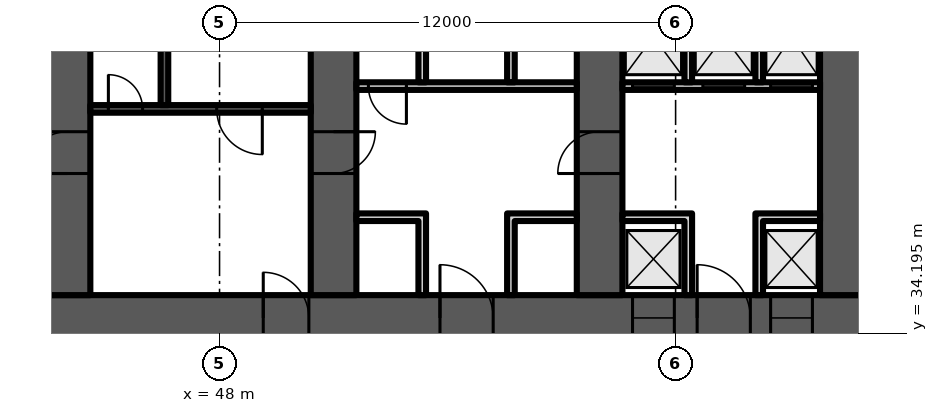
"""IFC4 building model, lengths in metres.
Left out: names, types, materials, properties, quantities, classifications, styles, units other than length and angle.
Written with IfcOpenShell. Run it as: python <this file> out.ifc"""

import sys

from ifc_helpers import new_model, si_unit, direction, frame, frame_2d, origin, place, context, subcontext, project, spatial, polyline, rectangle, outline, extrude, element, fill, save


model = new_model("IFC4")
c1 = context("Model", 3, precision=1e-05, world=origin(), true_north=direction((0.0, 1.0)))
c2 = subcontext(c1, "Body", "Model", "MODEL_VIEW")
j1 = project(units=[si_unit("LENGTHUNIT", "METRE"), si_unit("PLANEANGLEUNIT", "RADIAN")], contexts=[c1])
p1 = place(None, origin())
s1 = spatial("IfcSite", under=j1, at=p1, CompositionType="ELEMENT")
p2 = place(p1, origin())
s2 = spatial("IfcBuilding", under=s1, at=p2, CompositionType="ELEMENT")
p3 = place(p2, frame((0.0, 0.0, 59.5)))
s3 = spatial("IfcBuildingStorey", under=s2, at=p3, CompositionType="ELEMENT", Elevation=59.5)
p4 = place(p3, frame((9.0, 34.6, 0.0), z_axis=(0.0, 0.0, 1.0), x_axis=(1.0, 0.0, 0.0)))
e1 = element("IfcWall", 1, at=p4, inside=s3, PredefinedType="SHEAR", context=c2, shape_type="SweptSolid", body=[
    extrude(rectangle(XDim=56.0, YDim=1.2, at=frame_2d((28.0, 0.0))), origin(), (0.0, 0.0, 1.0), 3.6),
])
p5 = place(p4, frame((2.0, 0.0, 0.0)))
e2 = element("IfcOpeningElement", 2, at=p5, cuts=e1, PredefinedType="OPENING", context=c2, shape_type="SweptSolid", body=[
    extrude(rectangle(XDim=1.0, YDim=2.1, at=frame_2d((0.5, 1.05))), frame((0.0, 0.61, 0.0), z_axis=(0.0, -1.0, 0.0), x_axis=(1.0, 0.0, 0.0)), (0.0, 0.0, 1.0), 1.22),
])
p6 = place(p4, frame((4.6, 0.0, 0.0)))
e3 = element("IfcOpeningElement", 3, at=p6, cuts=e1, PredefinedType="OPENING", context=c2, shape_type="SweptSolid", body=[
    extrude(rectangle(XDim=1.0, YDim=2.1, at=frame_2d((0.5, 1.05))), frame((0.0, 0.61, 0.0), z_axis=(0.0, -1.0, 0.0), x_axis=(1.0, 0.0, 0.0)), (0.0, 0.0, 1.0), 1.22),
])
p7 = place(p4, frame((7.867, 0.0, 0.0)))
e4 = element("IfcOpeningElement", 4, at=p7, cuts=e1, PredefinedType="OPENING", context=c2, shape_type="SweptSolid", body=[
    extrude(rectangle(XDim=1.1, YDim=2.1, at=frame_2d((0.55, 1.05))), frame((0.0, 0.61, 0.0), z_axis=(0.0, -1.0, 0.0), x_axis=(1.0, 0.0, 0.0)), (0.0, 0.0, 1.0), 1.22),
])
p8 = place(p4, frame((12.033, 0.0, 0.0)))
e5 = element("IfcOpeningElement", 5, at=p8, cuts=e1, PredefinedType="OPENING", context=c2, shape_type="SweptSolid", body=[
    extrude(rectangle(XDim=1.1, YDim=2.1, at=frame_2d((0.55, 1.05))), frame((0.0, 0.61, 0.0), z_axis=(0.0, -1.0, 0.0), x_axis=(1.0, 0.0, 0.0)), (0.0, 0.0, 1.0), 1.22),
])
p9 = place(p4, frame((9.8, 0.0, 0.0)))
e6 = element("IfcOpeningElement", 6, at=p9, cuts=e1, PredefinedType="OPENING", context=c2, shape_type="SweptSolid", body=[
    extrude(rectangle(XDim=1.4, YDim=2.1, at=frame_2d((0.7, 1.05))), frame((0.0, 0.61, 0.0), z_axis=(0.0, -1.0, 0.0), x_axis=(1.0, 0.0, 0.0)), (0.0, 0.0, 1.0), 1.22),
])
p10 = place(p4, frame((14.65, 0.0, 0.0)))
e7 = element("IfcOpeningElement", 7, at=p10, cuts=e1, PredefinedType="OPENING", context=c2, shape_type="SweptSolid", body=[
    extrude(rectangle(XDim=1.2, YDim=2.1, at=frame_2d((0.6, 1.05))), frame((0.0, 0.61, 0.0), z_axis=(0.0, -1.0, 0.0), x_axis=(1.0, 0.0, 0.0)), (0.0, 0.0, 1.0), 1.22),
])
p11 = place(p4, frame((21.867, 0.0, 0.0)))
e8 = element("IfcOpeningElement", 8, at=p11, cuts=e1, PredefinedType="OPENING", context=c2, shape_type="SweptSolid", body=[
    extrude(rectangle(XDim=1.1, YDim=2.1, at=frame_2d((0.55, 1.05))), frame((0.0, 0.61, 0.0), z_axis=(0.0, -1.0, 0.0), x_axis=(1.0, 0.0, 0.0)), (0.0, 0.0, 1.0), 1.22),
])
p12 = place(p4, frame((26.033, 0.0, 0.0)))
e9 = element("IfcOpeningElement", 9, at=p12, cuts=e1, PredefinedType="OPENING", context=c2, shape_type="SweptSolid", body=[
    extrude(rectangle(XDim=1.1, YDim=2.1, at=frame_2d((0.55, 1.05))), frame((0.0, 0.61, 0.0), z_axis=(0.0, -1.0, 0.0), x_axis=(1.0, 0.0, 0.0)), (0.0, 0.0, 1.0), 1.22),
])
p13 = place(p4, frame((23.8, 0.0, 0.0)))
e10 = element("IfcOpeningElement", 10, at=p13, cuts=e1, PredefinedType="OPENING", context=c2, shape_type="SweptSolid", body=[
    extrude(rectangle(XDim=1.4, YDim=2.1, at=frame_2d((0.7, 1.05))), frame((0.0, 0.61, 0.0), z_axis=(0.0, -1.0, 0.0), x_axis=(1.0, 0.0, 0.0)), (0.0, 0.0, 1.0), 1.22),
])
p14 = place(p4, frame((28.867, 0.0, 0.0)))
e11 = element("IfcOpeningElement", 11, at=p14, cuts=e1, PredefinedType="OPENING", context=c2, shape_type="SweptSolid", body=[
    extrude(rectangle(XDim=1.1, YDim=2.1, at=frame_2d((0.55, 1.05))), frame((0.0, 0.61, 0.0), z_axis=(0.0, -1.0, 0.0), x_axis=(1.0, 0.0, 0.0)), (0.0, 0.0, 1.0), 1.22),
])
p15 = place(p4, frame((33.033, 0.0, 0.0)))
e12 = element("IfcOpeningElement", 12, at=p15, cuts=e1, PredefinedType="OPENING", context=c2, shape_type="SweptSolid", body=[
    extrude(rectangle(XDim=1.1, YDim=2.1, at=frame_2d((0.55, 1.05))), frame((0.0, 0.61, 0.0), z_axis=(0.0, -1.0, 0.0), x_axis=(1.0, 0.0, 0.0)), (0.0, 0.0, 1.0), 1.22),
])
p16 = place(p4, frame((40.15, 0.0, 0.0)))
e13 = element("IfcOpeningElement", 13, at=p16, cuts=e1, PredefinedType="OPENING", context=c2, shape_type="SweptSolid", body=[
    extrude(rectangle(XDim=1.2, YDim=2.1, at=frame_2d((0.6, 1.05))), frame((0.0, 0.61, 0.0), z_axis=(0.0, -1.0, 0.0), x_axis=(1.0, 0.0, 0.0)), (0.0, 0.0, 1.0), 1.22),
])
p17 = place(p4, frame((44.8, 0.0, 0.0)))
e14 = element("IfcOpeningElement", 14, at=p17, cuts=e1, PredefinedType="OPENING", context=c2, shape_type="SweptSolid", body=[
    extrude(rectangle(XDim=1.4, YDim=2.1, at=frame_2d((0.7, 1.05))), frame((0.0, 0.61, 0.0), z_axis=(0.0, -1.0, 0.0), x_axis=(1.0, 0.0, 0.0)), (0.0, 0.0, 1.0), 1.22),
])
p18 = place(p4, frame((49.867, 0.0, 0.0)))
e15 = element("IfcOpeningElement", 15, at=p18, cuts=e1, PredefinedType="OPENING", context=c2, shape_type="SweptSolid", body=[
    extrude(rectangle(XDim=1.1, YDim=2.1, at=frame_2d((0.55, 1.05))), frame((0.0, 0.61, 0.0), z_axis=(0.0, -1.0, 0.0), x_axis=(1.0, 0.0, 0.0)), (0.0, 0.0, 1.0), 1.22),
])
p19 = place(p4, frame((53.5, 0.0, 0.0)))
e16 = element("IfcOpeningElement", 16, at=p19, cuts=e1, PredefinedType="OPENING", context=c2, shape_type="SweptSolid", body=[
    extrude(rectangle(XDim=1.1, YDim=2.1, at=frame_2d((0.55, 1.05))), frame((0.0, 0.61, 0.0), z_axis=(0.0, -1.0, 0.0), x_axis=(1.0, 0.0, 0.0)), (0.0, 0.0, 1.0), 1.22),
])
p20 = place(p4, frame((51.567, 0.0, 0.0)))
e17 = element("IfcOpeningElement", 17, at=p20, cuts=e1, PredefinedType="OPENING", context=c2, shape_type="SweptSolid", body=[
    extrude(rectangle(XDim=1.4, YDim=2.1, at=frame_2d((0.7, 1.05))), frame((0.0, 0.61, 0.0), z_axis=(0.0, -1.0, 0.0), x_axis=(1.0, 0.0, 0.0)), (0.0, 0.0, 1.0), 1.22),
])
p21 = place(p3, frame((44.0, 35.2, 0.0), z_axis=(0.0, 0.0, 1.0), x_axis=(0.0, 1.0, 0.0)))
e18 = element("IfcWall", 18, at=p21, inside=s3, PredefinedType="SHEAR", context=c2, shape_type="SweptSolid", body=[
    extrude(rectangle(XDim=14.168, YDim=1.2, at=frame_2d((7.084, 0.0))), origin(), (0.0, 0.0, 1.0), 3.6),
])
p22 = place(p21, frame((3.2, 0.0, 0.0)))
e19 = element("IfcOpeningElement", 19, at=p22, cuts=e18, PredefinedType="OPENING", context=c2, shape_type="SweptSolid", body=[
    extrude(rectangle(XDim=1.1, YDim=2.1, at=frame_2d((0.55, 1.05))), frame((0.0, 0.61, 0.0), z_axis=(0.0, -1.0, 0.0), x_axis=(1.0, 0.0, 0.0)), (0.0, 0.0, 1.0), 1.22),
])
p23 = place(p21, frame((9.6, 0.0, 0.0)))
e20 = element("IfcOpeningElement", 20, at=p23, cuts=e18, PredefinedType="OPENING", context=c2, shape_type="SweptSolid", body=[
    extrude(rectangle(XDim=1.0, YDim=2.1, at=frame_2d((0.5, 1.05))), frame((0.0, 0.61, 0.0), z_axis=(0.0, -1.0, 0.0), x_axis=(1.0, 0.0, 0.0)), (0.0, 0.0, 1.0), 1.22),
])
p24 = place(p3, frame((51.0, 35.2, 0.0), z_axis=(0.0, 0.0, 1.0), x_axis=(0.0, 1.0, 0.0)))
e21 = element("IfcWall", 21, at=p24, inside=s3, PredefinedType="SHEAR", context=c2, shape_type="SweptSolid", body=[
    extrude(rectangle(XDim=13.555, YDim=1.2, at=frame_2d((6.778, 0.0))), origin(), (0.0, 0.0, 1.0), 3.6),
])
p25 = place(p24, frame((3.2, 0.0, 0.0)))
e22 = element("IfcOpeningElement", 22, at=p25, cuts=e21, PredefinedType="OPENING", context=c2, shape_type="SweptSolid", body=[
    extrude(rectangle(XDim=1.1, YDim=2.1, at=frame_2d((0.55, 1.05))), frame((0.0, 0.61, 0.0), z_axis=(0.0, -1.0, 0.0), x_axis=(1.0, 0.0, 0.0)), (0.0, 0.0, 1.0), 1.22),
])
p26 = place(p3, frame((58.0, 35.2, 0.0), z_axis=(0.0, 0.0, 1.0), x_axis=(0.0, 1.0, 0.0)))
e23 = element("IfcWall", 23, at=p26, inside=s3, PredefinedType="SHEAR", context=c2, shape_type="SweptSolid", body=[
    extrude(rectangle(XDim=12.943, YDim=1.2, at=frame_2d((6.471, 0.0))), origin(), (0.0, 0.0, 1.0), 3.6),
])
p27 = place(p26, frame((10.134, 0.0, 0.0)))
e24 = element("IfcOpeningElement", 24, at=p27, cuts=e23, PredefinedType="OPENING", context=c2, shape_type="SweptSolid", body=[
    extrude(rectangle(XDim=1.0, YDim=2.1, at=frame_2d((0.5, 1.05))), frame((0.0, 0.61, 0.0), z_axis=(0.0, -1.0, 0.0), x_axis=(1.0, 0.0, 0.0)), (0.0, 0.0, 1.0), 1.22),
])
p28 = place(p26, frame((3.2, 0.0, 0.0)))
e25 = element("IfcOpeningElement", 25, at=p28, cuts=e23, PredefinedType="OPENING", context=c2, shape_type="SweptSolid", body=[
    extrude(rectangle(XDim=1.1, YDim=2.1, at=frame_2d((0.55, 1.05))), frame((0.0, 0.61, 0.0), z_axis=(0.0, -1.0, 0.0), x_axis=(1.0, 0.0, 0.0)), (0.0, 0.0, 1.0), 1.22),
])
p29 = place(p3, frame((64.4, 35.2, 0.0), z_axis=(0.0, 0.0, 1.0), x_axis=(0.0, 1.0, 0.0)))
e26 = element("IfcWall", 26, at=p29, inside=s3, PredefinedType="SHEAR", context=c2, shape_type="SweptSolid", body=[
    extrude(rectangle(XDim=12.383, YDim=1.2, at=frame_2d((6.191, 0.0))), origin(), (0.0, 0.0, 1.0), 3.6),
])
p30 = place(p3, frame((44.6, 40.1, 0.0), z_axis=(0.0, 0.0, 1.0), x_axis=(1.0, 0.0, 0.0)))
e27 = element("IfcWall", 27, at=p30, inside=s3, PredefinedType="SHEAR", context=c2, shape_type="SweptSolid", body=[
    extrude(rectangle(XDim=5.8, YDim=0.2, at=frame_2d((2.9, 0.0))), origin(), (0.0, 0.0, 1.0), 3.2),
])
p31 = place(p30, frame((3.325, 0.0, 0.0)))
e28 = element("IfcOpeningElement", 28, at=p31, cuts=e27, PredefinedType="OPENING", context=c2, shape_type="SweptSolid", body=[
    extrude(rectangle(XDim=1.2, YDim=2.1, at=frame_2d((0.6, 1.05))), frame((0.0, 0.11, 0.0), z_axis=(0.0, -1.0, 0.0), x_axis=(1.0, 0.0, 0.0)), (0.0, 0.0, 1.0), 0.22),
])
p32 = place(p30, frame((0.475, 0.0, 0.0)))
e29 = element("IfcOpeningElement", 29, at=p32, cuts=e27, PredefinedType="OPENING", context=c2, shape_type="SweptSolid", body=[
    extrude(rectangle(XDim=0.9, YDim=2.1, at=frame_2d((0.45, 1.05))), frame((0.0, 0.11, 0.0), z_axis=(0.0, -1.0, 0.0), x_axis=(1.0, 0.0, 0.0)), (0.0, 0.0, 1.0), 0.22),
])
p33 = place(p3, frame((46.55, 40.2, 0.0), z_axis=(0.0, 0.0, 1.0), x_axis=(0.0, 1.0, 0.0)))
e30 = element("IfcWall", 30, at=p33, inside=s3, PredefinedType="SHEAR", context=c2, shape_type="SweptSolid", body=[
    extrude(rectangle(XDim=7.2, YDim=0.2, at=frame_2d((3.6, 0.0))), origin(), (0.0, 0.0, 1.0), 3.2),
])
p34 = place(p3, frame((51.6, 40.7, 0.0), z_axis=(0.0, 0.0, 1.0), x_axis=(1.0, 0.0, 0.0)))
e31 = element("IfcWall", 31, at=p34, inside=s3, PredefinedType="PARTITIONING", context=c2, shape_type="SweptSolid", body=[
    extrude(rectangle(XDim=5.8, YDim=0.2, at=frame_2d((2.9, 0.0))), origin(), (0.0, 0.0, 1.0), 3.2),
])
p35 = place(p34, frame((0.317, 0.0, 0.0)))
e32 = element("IfcOpeningElement", 32, at=p35, cuts=e31, PredefinedType="OPENING", context=c2, shape_type="SweptSolid", body=[
    extrude(rectangle(XDim=1.0, YDim=2.1, at=frame_2d((0.5, 1.05))), frame((0.0, 0.11, 0.0), z_axis=(0.0, -1.0, 0.0), x_axis=(1.0, 0.0, 0.0)), (0.0, 0.0, 1.0), 0.22),
])
p36 = place(p3, frame((0.0, 0.0, -0.0)))
e33 = element("IfcWall", 33, at=p36, inside=s3, PredefinedType="PARTITIONING", context=c2, shape_type="SweptSolid", body=[
    extrude(outline(polyline([(53.233, 37.15), (51.6, 37.15), (51.6, 37.35), (53.233, 37.35), (53.433, 37.35), (53.433, 35.2), (53.233, 35.2), (53.233, 37.15)])), origin(), (0.0, 0.0, 1.0), 3.2),
])
p37 = place(p3, frame((0.0, 0.0, -0.0)))
e34 = element("IfcWall", 34, at=p37, inside=s3, PredefinedType="PARTITIONING", context=c2, shape_type="SweptSolid", body=[
    extrude(outline(polyline([(55.567, 37.35), (55.767, 37.35), (57.4, 37.35), (57.4, 37.15), (55.767, 37.15), (55.767, 35.2), (55.567, 35.2), (55.567, 37.35)])), origin(), (0.0, 0.0, 1.0), 3.2),
])
p38 = place(p3, frame((0.0, 0.0, -0.0)))
e35 = element("IfcWall", 35, at=p38, inside=s3, PredefinedType="PARTITIONING", context=c2, shape_type="SweptSolid", body=[
    extrude(outline(polyline([(53.233, 40.8), (53.233, 43.8), (53.433, 43.8), (53.433, 40.8), (53.233, 40.8)])), origin(), (0.0, 0.0, 1.0), 3.2),
])
p39 = place(p3, frame((0.0, 0.0, -0.0)))
e36 = element("IfcWall", 36, at=p39, inside=s3, PredefinedType="PARTITIONING", context=c2, shape_type="SweptSolid", body=[
    extrude(outline(polyline([(55.567, 40.8), (55.567, 43.8), (55.767, 43.8), (55.767, 40.8), (55.567, 40.8)])), origin(), (0.0, 0.0, 1.0), 3.2),
])
p40 = place(p3, frame((58.6, 40.7, 0.0), z_axis=(0.0, 0.0, 1.0), x_axis=(1.0, 0.0, 0.0)))
e37 = element("IfcWall", 37, at=p40, inside=s3, PredefinedType="PARTITIONING", context=c2, shape_type="SweptSolid", body=[
    extrude(rectangle(XDim=5.2, YDim=0.2, at=frame_2d((2.6, 0.0))), origin(), (0.0, 0.0, 1.0), 3.2),
])
p41 = place(p40, frame((0.267, 0.0, 0.0)))
e38 = element("IfcOpeningElement", 38, at=p41, cuts=e37, PredefinedType="OPENING", context=c2, shape_type="SweptSolid", body=[
    extrude(rectangle(XDim=1.1, YDim=2.1, at=frame_2d((0.55, 1.05))), frame((0.0, 0.11, 0.0), z_axis=(0.0, -1.0, 0.0), x_axis=(1.0, 0.0, 0.0)), (0.0, 0.0, 1.0), 0.22),
])
p42 = place(p40, frame((2.117, 0.0, 0.0)))
e39 = element("IfcOpeningElement", 39, at=p42, cuts=e37, PredefinedType="OPENING", context=c2, shape_type="SweptSolid", body=[
    extrude(rectangle(XDim=1.1, YDim=2.1, at=frame_2d((0.55, 1.05))), frame((0.0, 0.11, 0.0), z_axis=(0.0, -1.0, 0.0), x_axis=(1.0, 0.0, 0.0)), (0.0, 0.0, 1.0), 0.22),
])
p43 = place(p40, frame((3.9, 0.0, 0.0)))
e40 = element("IfcOpeningElement", 40, at=p43, cuts=e37, PredefinedType="OPENING", context=c2, shape_type="SweptSolid", body=[
    extrude(rectangle(XDim=1.1, YDim=2.1, at=frame_2d((0.55, 1.05))), frame((0.0, 0.11, 0.0), z_axis=(0.0, -1.0, 0.0), x_axis=(1.0, 0.0, 0.0)), (0.0, 0.0, 1.0), 0.22),
])
p44 = place(p3, frame((0.0, 0.0, -0.0)))
e41 = element("IfcWall", 41, at=p44, inside=s3, PredefinedType="PARTITIONING", context=c2, shape_type="SweptSolid", body=[
    extrude(outline(polyline([(60.233, 37.15), (58.6, 37.15), (58.6, 37.35), (60.233, 37.35), (60.433, 37.35), (60.433, 35.2), (60.233, 35.2), (60.233, 37.15)])), origin(), (0.0, 0.0, 1.0), 3.2),
])
p45 = place(p3, frame((0.0, 0.0, -0.0)))
e42 = element("IfcWall", 42, at=p45, inside=s3, PredefinedType="PARTITIONING", context=c2, shape_type="SweptSolid", body=[
    extrude(outline(polyline([(62.1, 37.35), (62.3, 37.35), (63.8, 37.35), (63.8, 37.15), (62.3, 37.15), (62.3, 35.2), (62.1, 35.2), (62.1, 37.35)])), origin(), (0.0, 0.0, 1.0), 3.2),
])
p46 = place(p3, frame((0.0, 0.0, -0.0)))
e43 = element("IfcWall", 43, at=p46, inside=s3, PredefinedType="PARTITIONING", context=c2, shape_type="SweptSolid", body=[
    extrude(outline(polyline([(60.433, 40.8), (60.233, 40.8), (60.233, 43.8), (58.6, 43.8), (58.6, 44.0), (63.8, 44.0), (63.8, 43.8), (62.3, 43.8), (62.3, 40.8), (62.1, 40.8), (62.1, 43.8), (60.433, 43.8), (60.433, 40.8)])), origin(), (0.0, 0.0, 1.0), 3.2),
])
p47 = place(p31, origin())
e44 = element("IfcDoor", 44, at=p47, inside=s3, OperationType="SINGLE_SWING_RIGHT", PredefinedType="DOOR", context=c2, shape_type="SweptSolid", body=[
    extrude(rectangle(XDim=1.2, YDim=2.1, at=frame_2d((0.6, 1.05))), frame((0.0, 0.025, 0.0), z_axis=(0.0, -1.0, 0.0), x_axis=(1.0, 0.0, 0.0)), (0.0, 0.0, 1.0), 0.05),
])
fill(e28, e44)
p48 = place(p32, origin())
e45 = element("IfcDoor", 45, at=p48, inside=s3, OperationType="SINGLE_SWING_LEFT", PredefinedType="DOOR", context=c2, shape_type="SweptSolid", body=[
    extrude(rectangle(XDim=0.9, YDim=2.1, at=frame_2d((0.45, 1.05))), frame((0.0, 0.025, 0.0), z_axis=(0.0, -1.0, 0.0), x_axis=(1.0, 0.0, 0.0)), (0.0, 0.0, 1.0), 0.05),
])
fill(e29, e45)
p49 = place(p16, origin())
e46 = element("IfcDoor", 46, at=p49, inside=s3, OperationType="SINGLE_SWING_LEFT", PredefinedType="DOOR", context=c2, shape_type="SweptSolid", body=[
    extrude(rectangle(XDim=1.2, YDim=2.1, at=frame_2d((0.6, 1.05))), frame((0.0, 0.025, 0.0), z_axis=(0.0, -1.0, 0.0), x_axis=(1.0, 0.0, 0.0)), (0.0, 0.0, 1.0), 0.05),
])
fill(e13, e46)
p50 = place(p17, origin())
e47 = element("IfcDoor", 47, at=p50, inside=s3, OperationType="DOUBLE_DOOR_SINGLE_SWING", PredefinedType="DOOR", context=c2, shape_type="SweptSolid", body=[
    extrude(rectangle(XDim=1.4, YDim=2.1, at=frame_2d((0.7, 1.05))), frame((0.0, 0.025, 0.0), z_axis=(0.0, -1.0, 0.0), x_axis=(1.0, 0.0, 0.0)), (0.0, 0.0, 1.0), 0.05),
])
fill(e14, e47)
p51 = place(p35, origin())
e48 = element("IfcDoor", 48, at=p51, inside=s3, OperationType="SINGLE_SWING_RIGHT", PredefinedType="DOOR", context=c2, shape_type="SweptSolid", body=[
    extrude(rectangle(XDim=1.0, YDim=2.1, at=frame_2d((0.5, 1.05))), frame((0.0, 0.025, 0.0), z_axis=(0.0, -1.0, 0.0), x_axis=(1.0, 0.0, 0.0)), (0.0, 0.0, 1.0), 0.05),
])
fill(e32, e48)
p52 = place(p18, origin())
e49 = element("IfcDoor", 49, at=p52, inside=s3, OperationType="DOUBLE_DOOR_SLIDING", PredefinedType="DOOR", context=c2, shape_type="SweptSolid", body=[
    extrude(rectangle(XDim=1.1, YDim=2.1, at=frame_2d((0.55, 1.05))), frame((0.0, 0.025, 0.0), z_axis=(0.0, -1.0, 0.0), x_axis=(1.0, 0.0, 0.0)), (0.0, 0.0, 1.0), 0.05),
])
fill(e15, e49)
p53 = place(p19, origin())
e50 = element("IfcDoor", 50, at=p53, inside=s3, OperationType="DOUBLE_DOOR_SLIDING", PredefinedType="DOOR", context=c2, shape_type="SweptSolid", body=[
    extrude(rectangle(XDim=1.1, YDim=2.1, at=frame_2d((0.55, 1.05))), frame((0.0, 0.025, 0.0), z_axis=(0.0, -1.0, 0.0), x_axis=(1.0, 0.0, 0.0)), (0.0, 0.0, 1.0), 0.05),
])
fill(e16, e50)
p54 = place(p20, origin())
e51 = element("IfcDoor", 51, at=p54, inside=s3, OperationType="DOUBLE_DOOR_SINGLE_SWING", PredefinedType="DOOR", context=c2, shape_type="SweptSolid", body=[
    extrude(rectangle(XDim=1.4, YDim=2.1, at=frame_2d((0.7, 1.05))), frame((0.0, 0.025, 0.0), z_axis=(0.0, -1.0, 0.0), x_axis=(1.0, 0.0, 0.0)), (0.0, 0.0, 1.0), 0.05),
])
fill(e17, e51)
p55 = place(p41, origin())
e52 = element("IfcDoor", 52, at=p55, inside=s3, OperationType="DOUBLE_DOOR_SLIDING", PredefinedType="DOOR", context=c2, shape_type="SweptSolid", body=[
    extrude(rectangle(XDim=1.1, YDim=2.1, at=frame_2d((0.55, 1.05))), frame((0.0, 0.025, 0.0), z_axis=(0.0, -1.0, 0.0), x_axis=(1.0, 0.0, 0.0)), (0.0, 0.0, 1.0), 0.05),
])
fill(e38, e52)
p56 = place(p42, origin())
e53 = element("IfcDoor", 53, at=p56, inside=s3, OperationType="DOUBLE_DOOR_SLIDING", PredefinedType="DOOR", context=c2, shape_type="SweptSolid", body=[
    extrude(rectangle(XDim=1.1, YDim=2.1, at=frame_2d((0.55, 1.05))), frame((0.0, 0.025, 0.0), z_axis=(0.0, -1.0, 0.0), x_axis=(1.0, 0.0, 0.0)), (0.0, 0.0, 1.0), 0.05),
])
fill(e39, e53)
p57 = place(p43, origin())
e54 = element("IfcDoor", 54, at=p57, inside=s3, OperationType="DOUBLE_DOOR_SLIDING", PredefinedType="DOOR", context=c2, shape_type="SweptSolid", body=[
    extrude(rectangle(XDim=1.1, YDim=2.1, at=frame_2d((0.55, 1.05))), frame((0.0, 0.025, 0.0), z_axis=(0.0, -1.0, 0.0), x_axis=(1.0, 0.0, 0.0)), (0.0, 0.0, 1.0), 0.05),
])
fill(e40, e54)
p58 = place(p22, origin())
e55 = element("IfcDoor", 55, at=p58, inside=s3, OperationType="SINGLE_SWING_LEFT", PredefinedType="DOOR", context=c2, shape_type="SweptSolid", body=[
    extrude(rectangle(XDim=1.1, YDim=2.1, at=frame_2d((0.55, 1.05))), frame((0.0, 0.025, 0.0), z_axis=(0.0, -1.0, 0.0), x_axis=(1.0, 0.0, 0.0)), (0.0, 0.0, 1.0), 0.05),
])
fill(e19, e55)
p59 = place(p25, origin())
e56 = element("IfcDoor", 56, at=p59, inside=s3, OperationType="SINGLE_SWING_RIGHT", PredefinedType="DOOR", context=c2, shape_type="SweptSolid", body=[
    extrude(rectangle(XDim=1.1, YDim=2.1, at=frame_2d((0.55, 1.05))), frame((0.0, 0.025, 0.0), z_axis=(0.0, -1.0, 0.0), x_axis=(1.0, 0.0, 0.0)), (0.0, 0.0, 1.0), 0.05),
])
fill(e22, e56)
p60 = place(p28, origin())
e57 = element("IfcDoor", 57, at=p60, inside=s3, OperationType="SINGLE_SWING_LEFT", PredefinedType="DOOR", context=c2, shape_type="SweptSolid", body=[
    extrude(rectangle(XDim=1.1, YDim=2.1, at=frame_2d((0.55, 1.05))), frame((0.0, 0.025, 0.0), z_axis=(0.0, -1.0, 0.0), x_axis=(1.0, 0.0, 0.0)), (0.0, 0.0, 1.0), 0.05),
])
fill(e25, e57)
save(model, sys.argv[1])
